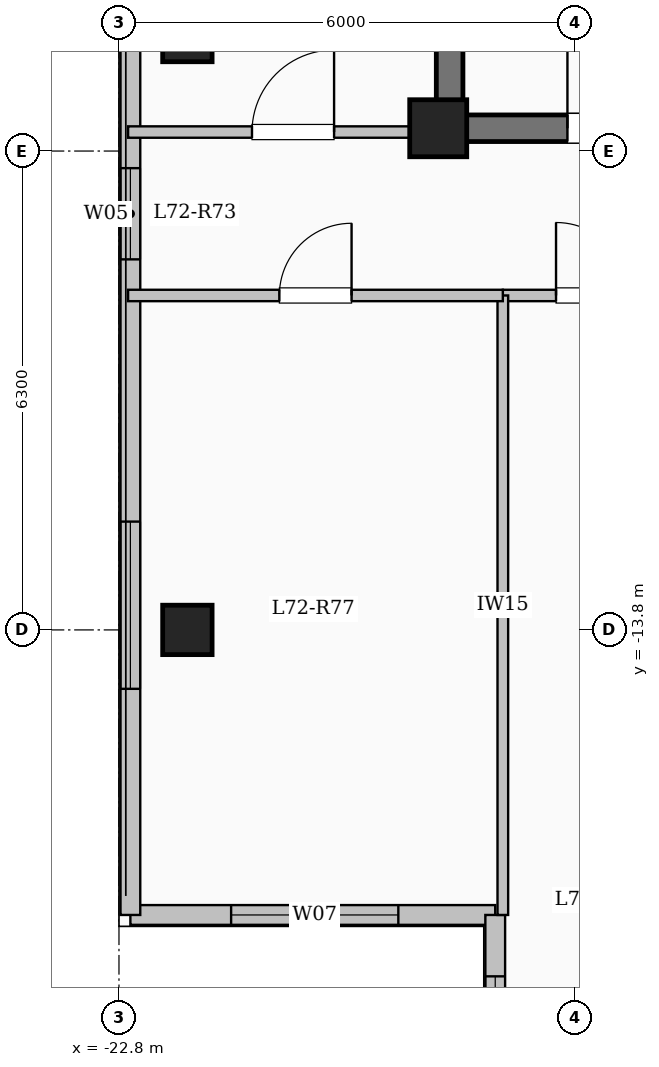
"""IFC4 building model, lengths in metres.
Left out: names, types, materials, properties, quantities, classifications, styles, units other than length and angle.
Written with IfcOpenShell. Run it as: python <this file> out.ifc"""

import sys

from ifc_helpers import new_model, si_unit, direction, frame, frame_2d, origin, origin_2d, place, context, subcontext, project, spatial, rectangle, extrude, element, fill, save


model = new_model("IFC4")
c1 = context("Model", 3, precision=1e-05, world=origin(), true_north=direction((0.0, 1.0)))
c2 = subcontext(c1, "Body", "Model", "MODEL_VIEW")
j1 = project(units=[si_unit("LENGTHUNIT", "METRE"), si_unit("PLANEANGLEUNIT", "RADIAN")], contexts=[c1])
p1 = place(None, origin())
s1 = spatial("IfcSite", under=j1, at=p1, CompositionType="ELEMENT")
p2 = place(p1, origin())
s2 = spatial("IfcBuilding", under=s1, at=p2, CompositionType="ELEMENT")
p3 = place(p2, frame((0.0, 0.0, 264.95)))
s3 = spatial("IfcBuildingStorey", under=s2, at=p3, CompositionType="ELEMENT", Elevation=264.95)
p4 = place(p3, frame((-18.6, -7.2, 0.0), z_axis=(0.0, 0.0, 1.0), x_axis=(1.0, 0.0, 0.0)))
e1 = element("IfcColumn", 1, at=p4, inside=s3, PredefinedType="COLUMN", context=c2, shape_type="SweptSolid", body=[
    extrude(rectangle(XDim=0.75, YDim=0.75, at=origin_2d()), origin(), (0.0, 0.0, 1.0), 3.35),
])
for number, where, z_axis, x_axis in (
    (2, (-21.9, -13.8, 0.0), (0.0, 0.0, 1.0), (1.0, 0.0, 0.0)),
    (3, (-21.9, -6.0, 0.0), (0.0, 0.0, 1.0), (1.0, 0.0, 0.0)),
):
    element("IfcColumn", number, at=place(p3, frame(where, z_axis=z_axis, x_axis=x_axis)), inside=s3, PredefinedType="COLUMN", context=c2, shape_type="SweptSolid", body=[
        extrude(rectangle(XDim=0.65, YDim=0.65, at=origin_2d()), origin(), (0.0, 0.0, 1.0), 3.35),
    ])
p5 = place(p3, frame((-17.85, -17.55, 0.0), z_axis=(0.0, 0.0, 1.0), x_axis=(-1.0, 0.0, 0.0)))
e4 = element("IfcWall", 4, at=p5, inside=s3, PredefinedType="SOLIDWALL", context=c2, shape_type="SweptSolid", body=[
    extrude(rectangle(XDim=4.8, YDim=0.26, at=frame_2d((2.4, 0.0))), origin(), (0.0, 0.0, 1.0), 3.1),
])
p6 = place(p5, frame((1.275, 0.0, 0.9)))
e5 = element("IfcOpeningElement", 5, at=p6, cuts=e4, PredefinedType="OPENING", context=c2, shape_type="SweptSolid", body=[
    extrude(rectangle(XDim=2.2, YDim=1.75, at=frame_2d((1.1, 0.875))), frame((0.0, 0.14, 0.0), z_axis=(0.0, -1.0, 0.0), x_axis=(1.0, 0.0, 0.0)), (0.0, 0.0, 1.0), 0.28),
])
p7 = place(p3, frame((-22.65, -17.55, 0.0), z_axis=(0.0, 0.0, 1.0), x_axis=(0.0, 1.0, 0.0)))
e6 = element("IfcWall", 6, at=p7, inside=s3, PredefinedType="SOLIDWALL", context=c2, shape_type="SweptSolid", body=[
    extrude(rectangle(XDim=35.1, YDim=0.26, at=frame_2d((17.55, 0.0))), origin(), (0.0, 0.0, 1.0), 3.1),
])
p8 = place(p7, frame((2.975, 0.0, 0.9)))
e7 = element("IfcOpeningElement", 7, at=p8, cuts=e6, PredefinedType="OPENING", context=c2, shape_type="SweptSolid", body=[
    extrude(rectangle(XDim=2.2, YDim=1.75, at=frame_2d((1.1, 0.875))), frame((0.0, 0.14, 0.0), z_axis=(0.0, -1.0, 0.0), x_axis=(1.0, 0.0, 0.0)), (0.0, 0.0, 1.0), 0.28),
])
p9 = place(p7, frame((8.625, 0.0, 0.95)))
e8 = element("IfcOpeningElement", 8, at=p9, cuts=e6, PredefinedType="OPENING", context=c2, shape_type="SweptSolid", body=[
    extrude(rectangle(XDim=1.2, YDim=1.5, at=frame_2d((0.6, 0.75))), frame((0.0, 0.14, 0.0), z_axis=(0.0, -1.0, 0.0), x_axis=(1.0, 0.0, 0.0)), (0.0, 0.0, 1.0), 0.28),
])
p10 = place(p7, frame((18.3, 0.0, 0.9)))
e9 = element("IfcOpeningElement", 9, at=p10, cuts=e6, PredefinedType="OPENING", context=c2, shape_type="SweptSolid", body=[
    extrude(rectangle(XDim=2.0, YDim=1.7, at=frame_2d((1.0, 0.85))), frame((0.0, 0.14, 0.0), z_axis=(0.0, -1.0, 0.0), x_axis=(1.0, 0.0, 0.0)), (0.0, 0.0, 1.0), 0.28),
])
p11 = place(p7, frame((28.675, 0.0, 0.95)))
e10 = element("IfcOpeningElement", 10, at=p11, cuts=e6, PredefinedType="OPENING", context=c2, shape_type="SweptSolid", body=[
    extrude(rectangle(XDim=1.0, YDim=1.5, at=frame_2d((0.5, 0.75))), frame((0.0, 0.14, 0.0), z_axis=(0.0, -1.0, 0.0), x_axis=(1.0, 0.0, 0.0)), (0.0, 0.0, 1.0), 0.28),
])
p12 = place(p7, frame((31.6, 0.0, 0.9)))
e11 = element("IfcOpeningElement", 11, at=p12, cuts=e6, PredefinedType="OPENING", context=c2, shape_type="SweptSolid", body=[
    extrude(rectangle(XDim=2.0, YDim=1.7, at=frame_2d((1.0, 0.85))), frame((0.0, 0.14, 0.0), z_axis=(0.0, -1.0, 0.0), x_axis=(1.0, 0.0, 0.0)), (0.0, 0.0, 1.0), 0.28),
])
p13 = place(p3, frame((-17.85, -20.85, 0.0), z_axis=(0.0, 0.0, 1.0), x_axis=(0.0, 1.0, 0.0)))
e12 = element("IfcWall", 12, at=p13, inside=s3, PredefinedType="SOLIDWALL", context=c2, shape_type="SweptSolid", body=[
    extrude(rectangle(XDim=3.3, YDim=0.26, at=frame_2d((1.65, 0.0))), origin(), (0.0, 0.0, 1.0), 3.1),
])
p14 = place(p13, frame((0.843, 0.0, 0.9)))
e13 = element("IfcOpeningElement", 13, at=p14, cuts=e12, PredefinedType="OPENING", context=c2, shape_type="SweptSolid", body=[
    extrude(rectangle(XDim=1.65, YDim=1.6, at=frame_2d((0.825, 0.8))), frame((0.0, 0.14, 0.0), z_axis=(0.0, -1.0, 0.0), x_axis=(1.0, 0.0, 0.0)), (0.0, 0.0, 1.0), 0.28),
])
p15 = place(p3, frame((-18.45, -7.375, 0.0), z_axis=(0.0, 0.0, 1.0), x_axis=(0.0, 1.0, 0.0)))
e14 = element("IfcWall", 14, at=p15, inside=s3, PredefinedType="SHEAR", context=c2, shape_type="SweptSolid", body=[
    extrude(rectangle(XDim=14.05, YDim=0.35, at=frame_2d((7.025, 0.0))), origin(), (0.0, 0.0, 1.0), 3.35),
])
p16 = place(p3, frame((-18.625, -7.2, 0.0), z_axis=(0.0, 0.0, 1.0), x_axis=(1.0, 0.0, 0.0)))
e15 = element("IfcWall", 15, at=p16, inside=s3, PredefinedType="SHEAR", context=c2, shape_type="SweptSolid", body=[
    extrude(rectangle(XDim=8.55, YDim=0.35, at=frame_2d((4.275, 0.0))), origin(), (0.0, 0.0, 1.0), 3.35),
])
p17 = place(p16, frame((1.725, 0.0, 0.0)))
e16 = element("IfcOpeningElement", 16, at=p17, cuts=e15, PredefinedType="OPENING", context=c2, shape_type="SweptSolid", body=[
    extrude(rectangle(XDim=1.12, YDim=2.15, at=frame_2d((0.56, 1.075))), frame((0.0, 0.185, 0.0), z_axis=(0.0, -1.0, 0.0), x_axis=(1.0, 0.0, 0.0)), (0.0, 0.0, 1.0), 0.37),
])
p18 = place(p3, frame((-17.75, -9.4, 0.0), z_axis=(0.0, 0.0, 1.0), x_axis=(1.0, 0.0, 0.0)))
e17 = element("IfcWall", 17, at=p18, inside=s3, PredefinedType="PARTITIONING", context=c2, shape_type="SweptSolid", body=[
    extrude(rectangle(XDim=9.2, YDim=0.15, at=frame_2d((4.6, 0.0))), origin(), (0.0, 0.0, 1.0), 3.1),
])
p19 = place(p18, frame((0.7, 0.0, 0.0)))
e18 = element("IfcOpeningElement", 18, at=p19, cuts=e17, PredefinedType="OPENING", context=c2, shape_type="SweptSolid", body=[
    extrude(rectangle(XDim=0.96, YDim=2.15, at=frame_2d((0.48, 1.075))), frame((0.0, 0.085, 0.0), z_axis=(0.0, -1.0, 0.0), x_axis=(1.0, 0.0, 0.0)), (0.0, 0.0, 1.0), 0.17),
])
p20 = place(p18, frame((5.275, 0.0, 0.0)))
e19 = element("IfcOpeningElement", 19, at=p20, cuts=e17, PredefinedType="OPENING", context=c2, shape_type="SweptSolid", body=[
    extrude(rectangle(XDim=0.96, YDim=2.15, at=frame_2d((0.48, 1.075))), frame((0.0, 0.085, 0.0), z_axis=(0.0, -1.0, 0.0), x_axis=(1.0, 0.0, 0.0)), (0.0, 0.0, 1.0), 0.17),
])
p21 = place(p3, frame((-22.68, -7.25, 0.0), z_axis=(0.0, 0.0, 1.0), x_axis=(1.0, 0.0, 0.0)))
e20 = element("IfcWall", 20, at=p21, inside=s3, PredefinedType="PARTITIONING", context=c2, shape_type="SweptSolid", body=[
    extrude(rectangle(XDim=4.23, YDim=0.15, at=frame_2d((2.115, 0.0))), origin(), (0.0, 0.0, 1.0), 3.1),
])
p22 = place(p21, frame((1.63, 0.0, 0.0)))
e21 = element("IfcOpeningElement", 21, at=p22, cuts=e20, PredefinedType="OPENING", context=c2, shape_type="SweptSolid", body=[
    extrude(rectangle(XDim=1.08, YDim=2.15, at=frame_2d((0.54, 1.075))), frame((0.0, 0.085, 0.0), z_axis=(0.0, -1.0, 0.0), x_axis=(1.0, 0.0, 0.0)), (0.0, 0.0, 1.0), 0.17),
])
p23 = place(p3, frame((-17.75, -17.55, 0.0), z_axis=(0.0, 0.0, 1.0), x_axis=(0.0, 1.0, 0.0)))
e22 = element("IfcWall", 22, at=p23, inside=s3, PredefinedType="PARTITIONING", context=c2, shape_type="SweptSolid", body=[
    extrude(rectangle(XDim=8.15, YDim=0.14, at=frame_2d((4.075, 0.0))), origin(), (0.0, 0.0, 1.0), 3.1),
])
p24 = place(p3, frame((-22.68, -9.4, 0.0), z_axis=(0.0, 0.0, 1.0), x_axis=(1.0, 0.0, 0.0)))
e23 = element("IfcWall", 23, at=p24, inside=s3, PredefinedType="PARTITIONING", context=c2, shape_type="SweptSolid", body=[
    extrude(rectangle(XDim=4.93, YDim=0.15, at=frame_2d((2.465, 0.0))), origin(), (0.0, 0.0, 1.0), 3.1),
])
p25 = place(p24, frame((1.99, 0.0, 0.0)))
e24 = element("IfcOpeningElement", 24, at=p25, cuts=e23, PredefinedType="OPENING", context=c2, shape_type="SweptSolid", body=[
    extrude(rectangle(XDim=0.95, YDim=2.15, at=frame_2d((0.475, 1.075))), frame((0.0, 0.085, 0.0), z_axis=(0.0, -1.0, 0.0), x_axis=(1.0, 0.0, 0.0)), (0.0, 0.0, 1.0), 0.17),
])
p26 = place(p6, origin())
e25 = element("IfcWindow", 25, at=p26, inside=s3, PartitioningType="SINGLE_PANEL", PredefinedType="WINDOW", context=c2, shape_type="SweptSolid", body=[
    extrude(rectangle(XDim=2.2, YDim=1.75, at=frame_2d((1.1, 0.875))), frame((0.0, 0.03, 0.0), z_axis=(0.0, -1.0, 0.0), x_axis=(1.0, 0.0, 0.0)), (0.0, 0.0, 1.0), 0.06),
])
fill(e5, e25)
p27 = place(p8, origin())
e26 = element("IfcWindow", 26, at=p27, inside=s3, PartitioningType="SINGLE_PANEL", PredefinedType="WINDOW", context=c2, shape_type="SweptSolid", body=[
    extrude(rectangle(XDim=2.2, YDim=1.75, at=frame_2d((1.1, 0.875))), frame((0.0, 0.03, 0.0), z_axis=(0.0, -1.0, 0.0), x_axis=(1.0, 0.0, 0.0)), (0.0, 0.0, 1.0), 0.06),
])
fill(e7, e26)
p28 = place(p9, origin())
e27 = element("IfcWindow", 27, at=p28, inside=s3, PartitioningType="SINGLE_PANEL", PredefinedType="WINDOW", context=c2, shape_type="SweptSolid", body=[
    extrude(rectangle(XDim=1.2, YDim=1.5, at=frame_2d((0.6, 0.75))), frame((0.0, 0.03, 0.0), z_axis=(0.0, -1.0, 0.0), x_axis=(1.0, 0.0, 0.0)), (0.0, 0.0, 1.0), 0.06),
])
fill(e8, e27)
p29 = place(p14, origin())
e28 = element("IfcWindow", 28, at=p29, inside=s3, PartitioningType="SINGLE_PANEL", PredefinedType="WINDOW", context=c2, shape_type="SweptSolid", body=[
    extrude(rectangle(XDim=1.65, YDim=1.6, at=frame_2d((0.825, 0.8))), frame((0.0, 0.03, 0.0), z_axis=(0.0, -1.0, 0.0), x_axis=(1.0, 0.0, 0.0)), (0.0, 0.0, 1.0), 0.06),
])
fill(e13, e28)
p30 = place(p17, origin())
e29 = element("IfcDoor", 29, at=p30, inside=s3, OperationType="SINGLE_SWING_LEFT", PredefinedType="DOOR", context=c2, shape_type="SweptSolid", body=[
    extrude(rectangle(XDim=1.12, YDim=2.15, at=frame_2d((0.56, 1.075))), frame((0.0, 0.025, 0.0), z_axis=(0.0, -1.0, 0.0), x_axis=(1.0, 0.0, 0.0)), (0.0, 0.0, 1.0), 0.05),
])
fill(e16, e29)
p31 = place(p19, origin())
e30 = element("IfcDoor", 30, at=p31, inside=s3, OperationType="SINGLE_SWING_LEFT", PredefinedType="DOOR", context=c2, shape_type="SweptSolid", body=[
    extrude(rectangle(XDim=0.96, YDim=2.15, at=frame_2d((0.48, 1.075))), frame((0.0, 0.025, 0.0), z_axis=(0.0, -1.0, 0.0), x_axis=(1.0, 0.0, 0.0)), (0.0, 0.0, 1.0), 0.05),
])
fill(e18, e30)
p32 = place(p25, origin())
e31 = element("IfcDoor", 31, at=p32, inside=s3, OperationType="SINGLE_SWING_RIGHT", PredefinedType="DOOR", context=c2, shape_type="SweptSolid", body=[
    extrude(rectangle(XDim=0.95, YDim=2.15, at=frame_2d((0.475, 1.075))), frame((0.0, 0.025, 0.0), z_axis=(0.0, -1.0, 0.0), x_axis=(1.0, 0.0, 0.0)), (0.0, 0.0, 1.0), 0.05),
])
fill(e24, e31)
p33 = place(p22, origin())
e32 = element("IfcDoor", 32, at=p33, inside=s3, OperationType="SINGLE_SWING_RIGHT", PredefinedType="DOOR", context=c2, shape_type="SweptSolid", body=[
    extrude(rectangle(XDim=1.08, YDim=2.15, at=frame_2d((0.54, 1.075))), frame((0.0, 0.025, 0.0), z_axis=(0.0, -1.0, 0.0), x_axis=(1.0, 0.0, 0.0)), (0.0, 0.0, 1.0), 0.05),
])
fill(e21, e32)
save(model, sys.argv[1])
